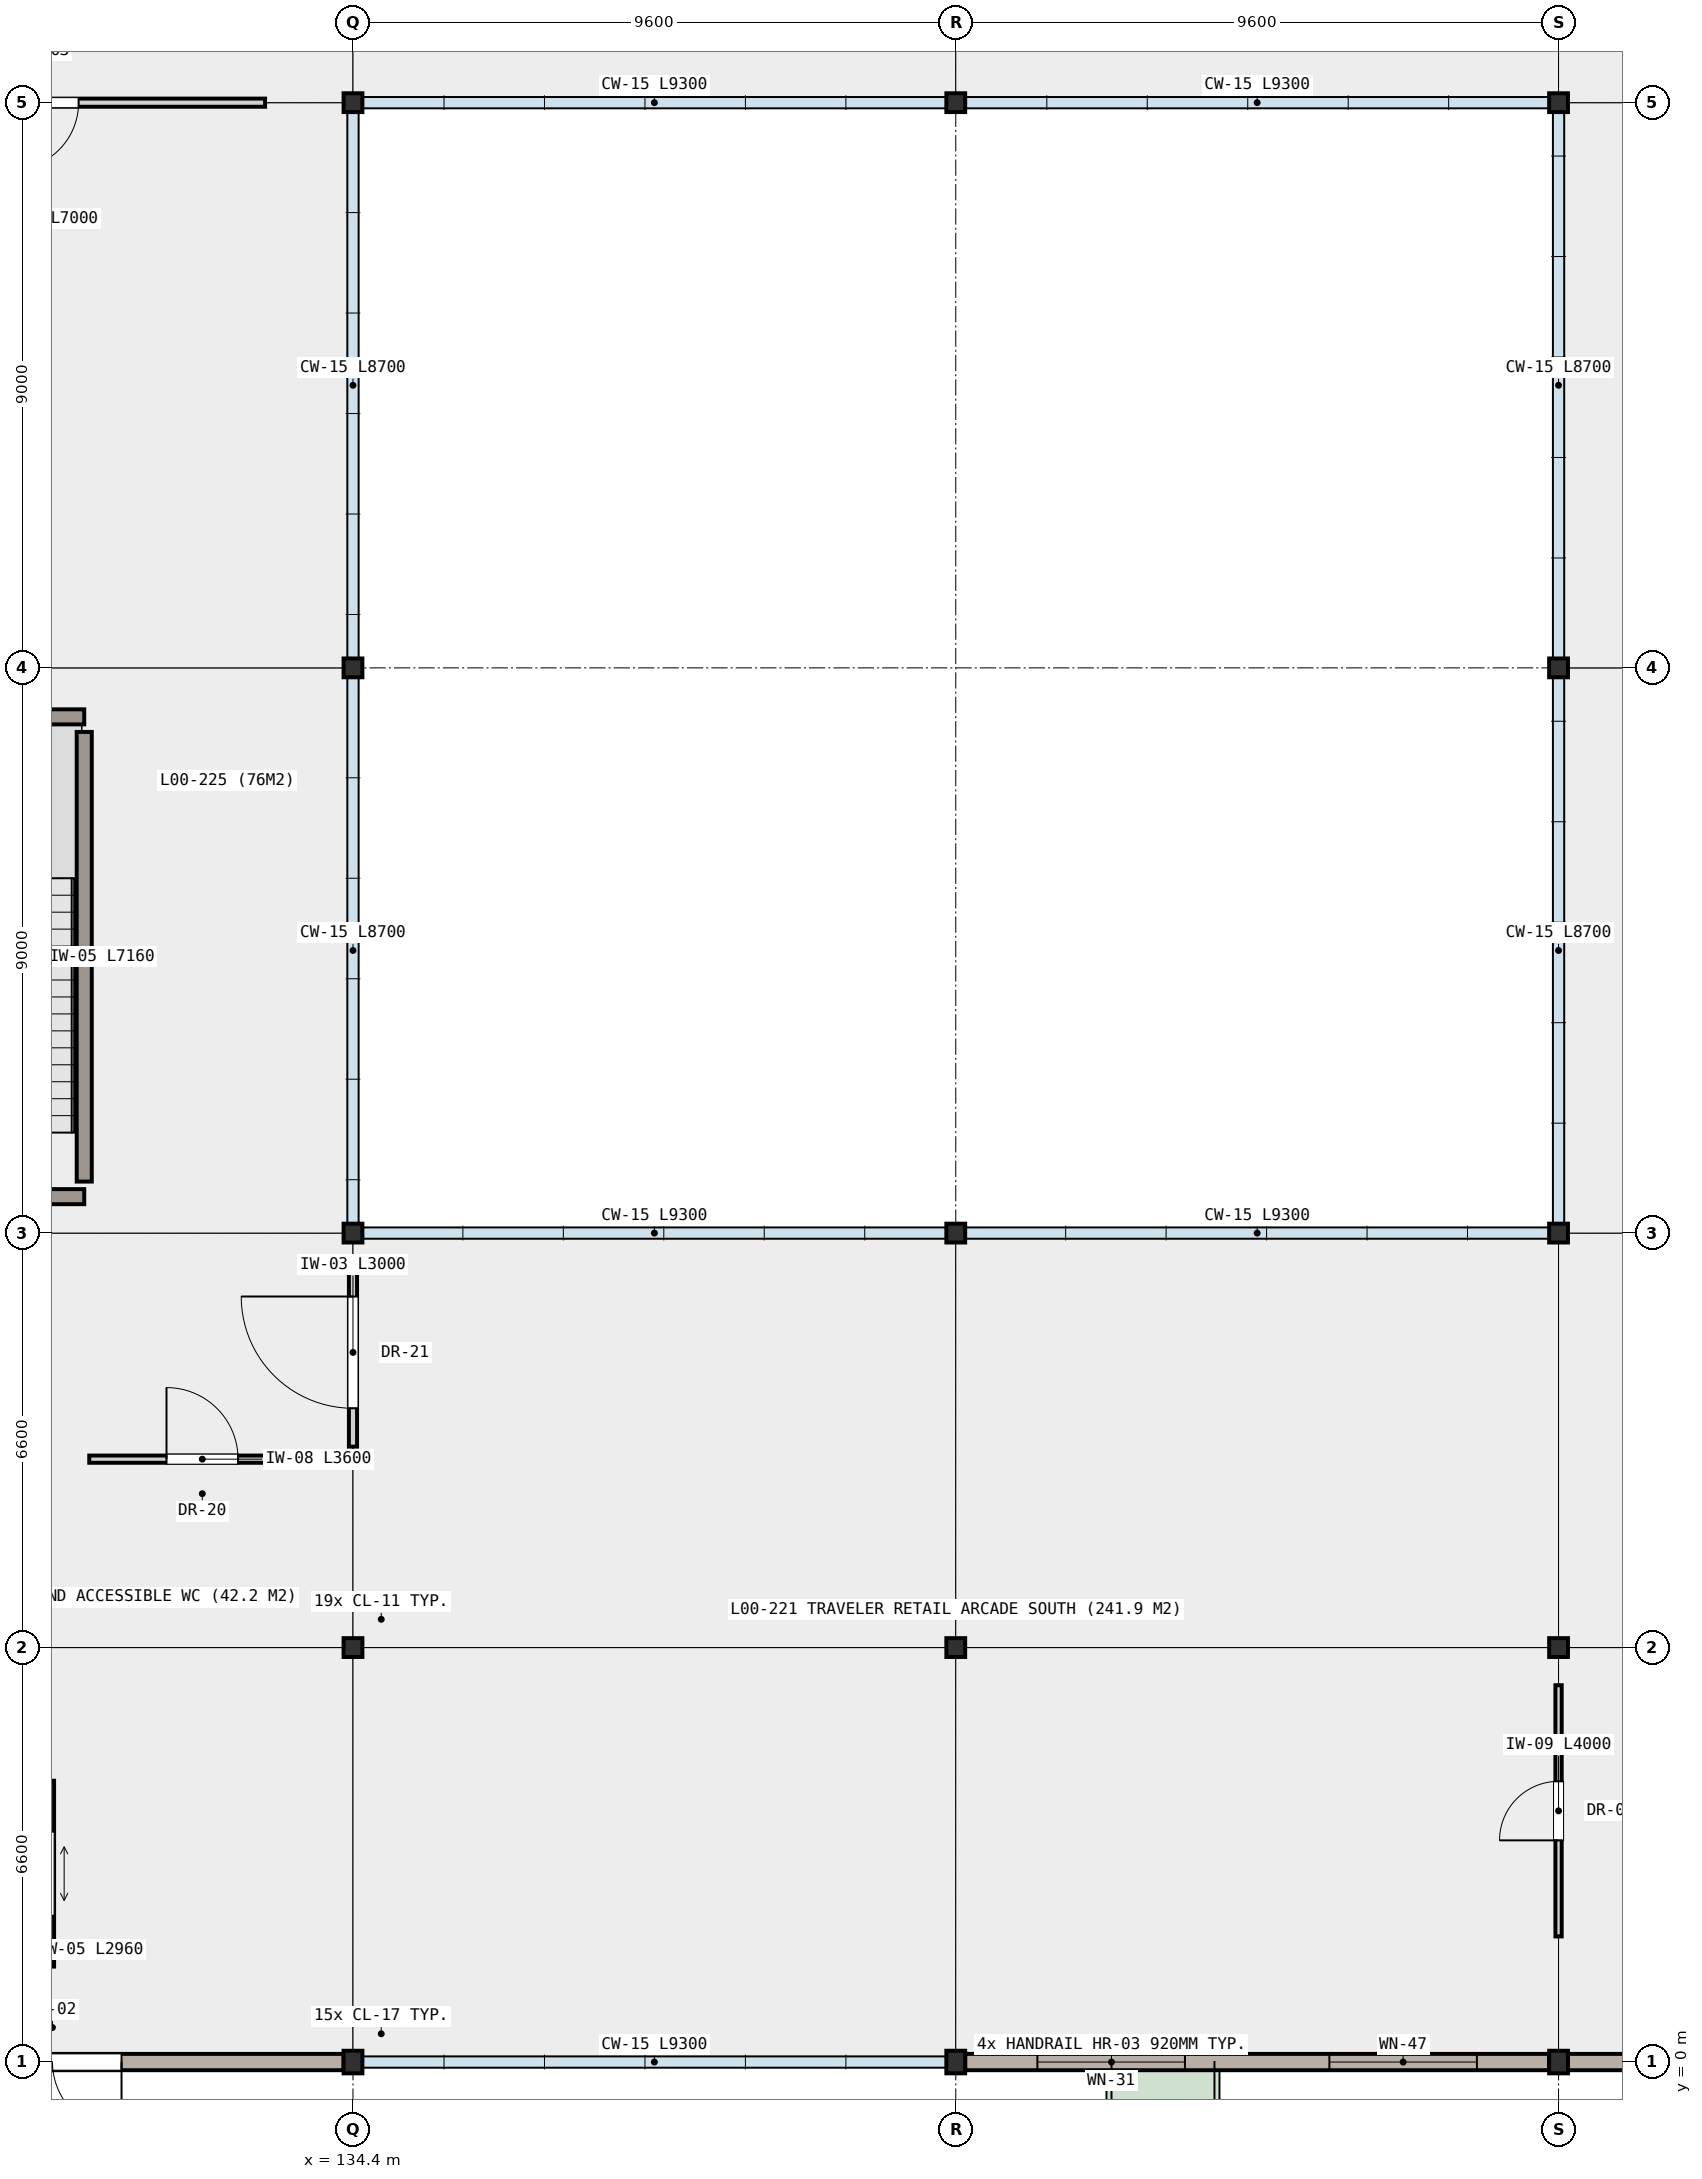
"""IFC4 building model, lengths in metres.
Left out: names, types, materials, properties, quantities, classifications, styles, units other than length and angle.
Written with IfcOpenShell. Run it as: python <this file> out.ifc"""

import sys

from ifc_helpers import new_model, si_unit, direction, frame, frame_2d, origin, origin_2d, place, context, subcontext, project, spatial, rectangle, i_section, extrude, element, fill, save


model = new_model("IFC4")
c1 = context("Model", 3, precision=1e-05, world=origin(), true_north=direction((0.0, 1.0)))
c2 = subcontext(c1, "Body", "Model", "MODEL_VIEW")
j1 = project(units=[si_unit("LENGTHUNIT", "METRE"), si_unit("PLANEANGLEUNIT", "RADIAN")], contexts=[c1])
p1 = place(None, origin())
s1 = spatial("IfcSite", under=j1, at=p1, CompositionType="ELEMENT")
p2 = place(p1, origin())
s2 = spatial("IfcBuilding", under=s1, at=p2, CompositionType="ELEMENT")
p3 = place(p2, origin())
s3 = spatial("IfcBuildingStorey", under=s2, at=p3, CompositionType="ELEMENT", Elevation=0.0)
p4 = place(p3, frame((134.4, 0.0, 0.0), z_axis=(0.0, 0.0, 1.0), x_axis=(1.0, 0.0, 0.0)))
e1 = element("IfcColumn", 1, at=p4, inside=s3, PredefinedType="COLUMN", context=c2, shape_type="SweptSolid", body=[
    extrude(i_section(OverallWidth=0.3, OverallDepth=0.36, WebThickness=0.012, FlangeThickness=0.022, FilletRadius=0.027, at=origin_2d()), origin(), (0.0, 0.0, 1.0), 5.4),
])
for number, where, z_axis, x_axis in (
    (2, (134.4, 6.6, 0.0), (0.0, 0.0, 1.0), (1.0, 0.0, 0.0)),
    (3, (134.4, 13.2, 0.0), (0.0, 0.0, 1.0), (1.0, 0.0, 0.0)),
    (4, (134.4, 22.2, 0.0), (0.0, 0.0, 1.0), (1.0, 0.0, 0.0)),
    (5, (134.4, 31.2, 0.0), (0.0, 0.0, 1.0), (1.0, 0.0, 0.0)),
):
    element("IfcColumn", number, at=place(p3, frame(where, z_axis=z_axis, x_axis=x_axis)), inside=s3, PredefinedType="COLUMN", context=c2, shape_type="SweptSolid", body=[
        extrude(i_section(OverallWidth=0.3, OverallDepth=0.3, WebThickness=0.011, FlangeThickness=0.019, FilletRadius=0.027, at=origin_2d()), origin(), (0.0, 0.0, 1.0), 5.4),
    ])
p5 = place(p3, frame((144.0, 0.0, 0.0), z_axis=(0.0, 0.0, 1.0), x_axis=(1.0, 0.0, 0.0)))
e6 = element("IfcColumn", 6, at=p5, inside=s3, PredefinedType="COLUMN", context=c2, shape_type="SweptSolid", body=[
    extrude(i_section(OverallWidth=0.3, OverallDepth=0.36, WebThickness=0.012, FlangeThickness=0.022, FilletRadius=0.027, at=origin_2d()), origin(), (0.0, 0.0, 1.0), 5.4),
])
for number, where, z_axis, x_axis in (
    (7, (144.0, 6.6, 0.0), (0.0, 0.0, 1.0), (1.0, 0.0, 0.0)),
    (8, (144.0, 13.2, 0.0), (0.0, 0.0, 1.0), (1.0, 0.0, 0.0)),
    (9, (144.0, 31.2, 0.0), (0.0, 0.0, 1.0), (1.0, 0.0, 0.0)),
):
    element("IfcColumn", number, at=place(p3, frame(where, z_axis=z_axis, x_axis=x_axis)), inside=s3, PredefinedType="COLUMN", context=c2, shape_type="SweptSolid", body=[
        extrude(i_section(OverallWidth=0.3, OverallDepth=0.3, WebThickness=0.011, FlangeThickness=0.019, FilletRadius=0.027, at=origin_2d()), origin(), (0.0, 0.0, 1.0), 5.4),
    ])
p6 = place(p3, frame((153.6, 0.0, 0.0), z_axis=(0.0, 0.0, 1.0), x_axis=(1.0, 0.0, 0.0)))
e10 = element("IfcColumn", 10, at=p6, inside=s3, PredefinedType="COLUMN", context=c2, shape_type="SweptSolid", body=[
    extrude(i_section(OverallWidth=0.3, OverallDepth=0.36, WebThickness=0.012, FlangeThickness=0.022, FilletRadius=0.027, at=origin_2d()), origin(), (0.0, 0.0, 1.0), 5.4),
])
for number, where, z_axis, x_axis in (
    (11, (153.6, 6.6, 0.0), (0.0, 0.0, 1.0), (1.0, 0.0, 0.0)),
    (12, (153.6, 13.2, 0.0), (0.0, 0.0, 1.0), (1.0, 0.0, 0.0)),
    (13, (153.6, 22.2, 0.0), (0.0, 0.0, 1.0), (1.0, 0.0, 0.0)),
    (14, (153.6, 31.2, 0.0), (0.0, 0.0, 1.0), (1.0, 0.0, 0.0)),
):
    element("IfcColumn", number, at=place(p3, frame(where, z_axis=z_axis, x_axis=x_axis)), inside=s3, PredefinedType="COLUMN", context=c2, shape_type="SweptSolid", body=[
        extrude(i_section(OverallWidth=0.3, OverallDepth=0.3, WebThickness=0.011, FlangeThickness=0.019, FilletRadius=0.027, at=origin_2d()), origin(), (0.0, 0.0, 1.0), 5.4),
    ])
p7 = place(p3, frame((163.05, 0.0, 0.0), z_axis=(0.0, 0.0, 1.0), x_axis=(-1.0, 0.0, 0.0)))
e15 = element("IfcWall", 15, at=p7, inside=s3, PredefinedType="SOLIDWALL", context=c2, shape_type="SweptSolid", body=[
    extrude(rectangle(XDim=9.3, YDim=0.26, at=frame_2d((4.65, 0.0))), origin(), (0.0, 0.0, 1.0), 4.73),
])
p8 = place(p7, frame((3.725, 0.0, 0.0)))
e16 = element("IfcOpeningElement", 16, at=p8, cuts=e15, PredefinedType="OPENING", context=c2, shape_type="SweptSolid", body=[
    extrude(rectangle(XDim=1.85, YDim=2.35, at=frame_2d((0.925, 1.175))), frame((0.0, 0.14, 0.0), z_axis=(0.0, -1.0, 0.0), x_axis=(1.0, 0.0, 0.0)), (0.0, 0.0, 1.0), 0.28),
])
p9 = place(p3, frame((153.45, 0.0, 0.0), z_axis=(0.0, 0.0, 1.0), x_axis=(-1.0, 0.0, 0.0)))
e17 = element("IfcWall", 17, at=p9, inside=s3, PredefinedType="SOLIDWALL", context=c2, shape_type="SweptSolid", body=[
    extrude(rectangle(XDim=9.3, YDim=0.26, at=frame_2d((4.65, 0.0))), origin(), (0.0, 0.0, 1.0), 4.73),
])
p10 = place(p9, frame((1.15, 0.0, 0.85)))
e18 = element("IfcOpeningElement", 18, at=p10, cuts=e17, PredefinedType="OPENING", context=c2, shape_type="SweptSolid", body=[
    extrude(rectangle(XDim=2.35, YDim=1.5, at=frame_2d((1.175, 0.75))), frame((0.0, 0.14, 0.0), z_axis=(0.0, -1.0, 0.0), x_axis=(1.0, 0.0, 0.0)), (0.0, 0.0, 1.0), 0.28),
])
p11 = place(p9, frame((5.8, 0.0, 0.85)))
e19 = element("IfcOpeningElement", 19, at=p11, cuts=e17, PredefinedType="OPENING", context=c2, shape_type="SweptSolid", body=[
    extrude(rectangle(XDim=2.35, YDim=1.85, at=frame_2d((1.175, 0.925))), frame((0.0, 0.14, 0.0), z_axis=(0.0, -1.0, 0.0), x_axis=(1.0, 0.0, 0.0)), (0.0, 0.0, 1.0), 0.28),
])
p12 = place(p3, frame((134.25, 0.0, 0.0), z_axis=(0.0, 0.0, 1.0), x_axis=(-1.0, 0.0, 0.0)))
e20 = element("IfcWall", 20, at=p12, inside=s3, PredefinedType="SOLIDWALL", context=c2, shape_type="SweptSolid", body=[
    extrude(rectangle(XDim=9.272, YDim=0.26, at=frame_2d((4.636, 0.0))), origin(), (0.0, 0.0, 1.0), 4.73),
])
p13 = place(p12, frame((3.536, 0.0, 0.0)))
e21 = element("IfcOpeningElement", 21, at=p13, cuts=e20, PredefinedType="OPENING", context=c2, shape_type="SweptSolid", body=[
    extrude(rectangle(XDim=2.2, YDim=2.55, at=frame_2d((1.1, 1.275))), frame((0.0, 0.14, 0.0), z_axis=(0.0, -1.0, 0.0), x_axis=(1.0, 0.0, 0.0)), (0.0, 0.0, 1.0), 0.28),
])
p14 = place(p3, frame((129.52, 4.48, 0.0), z_axis=(0.0, 0.0, 1.0), x_axis=(0.0, -1.0, 0.0)))
e22 = element("IfcWall", 22, at=p14, inside=s3, PredefinedType="SHEAR", context=c2, shape_type="SweptSolid", body=[
    extrude(rectangle(XDim=2.96, YDim=0.24, at=frame_2d((1.48, 0.0))), origin(), (0.0, 0.0, 1.0), 5.12),
])
p15 = place(p14, frame((0.81, 0.0, 0.0)))
e23 = element("IfcOpeningElement", 23, at=p15, cuts=e22, PredefinedType="OPENING", context=c2, shape_type="SweptSolid", body=[
    extrude(rectangle(XDim=1.34, YDim=2.18, at=frame_2d((0.67, 1.09))), frame((0.0, 0.13, 0.0), z_axis=(0.0, -1.0, 0.0), x_axis=(1.0, 0.0, 0.0)), (0.0, 0.0, 1.0), 0.26),
])
p16 = place(p3, frame((130.12, 13.78, 0.0), z_axis=(0.0, 0.0, 1.0), x_axis=(-1.0, 0.0, 0.0)))
e24 = element("IfcWall", 24, at=p16, inside=s3, PredefinedType="SHEAR", context=c2, shape_type="SweptSolid", body=[
    extrude(rectangle(XDim=4.54, YDim=0.24, at=frame_2d((2.27, 0.0))), origin(), (0.0, 0.0, 1.0), 5.12),
])
p17 = place(p16, frame((1.61, 0.0, 0.0)))
e25 = element("IfcOpeningElement", 25, at=p17, cuts=e24, PredefinedType="OPENING", context=c2, shape_type="SweptSolid", body=[
    extrude(rectangle(XDim=1.32, YDim=2.15, at=frame_2d((0.66, 1.075))), frame((0.0, 0.13, 0.0), z_axis=(0.0, -1.0, 0.0), x_axis=(1.0, 0.0, 0.0)), (0.0, 0.0, 1.0), 0.26),
])
p18 = place(p3, frame((125.58, 21.42, 0.0), z_axis=(0.0, 0.0, 1.0), x_axis=(1.0, 0.0, 0.0)))
e26 = element("IfcWall", 26, at=p18, inside=s3, PredefinedType="SHEAR", context=c2, shape_type="SweptSolid", body=[
    extrude(rectangle(XDim=4.54, YDim=0.24, at=frame_2d((2.27, 0.0))), origin(), (0.0, 0.0, 1.0), 5.12),
])
p19 = place(p3, frame((130.12, 21.18, 0.0), z_axis=(0.0, 0.0, 1.0), x_axis=(0.0, -1.0, 0.0)))
e27 = element("IfcWall", 27, at=p19, inside=s3, PredefinedType="SHEAR", context=c2, shape_type="SweptSolid", body=[
    extrude(rectangle(XDim=7.16, YDim=0.24, at=frame_2d((3.58, 0.0))), origin(), (0.0, 0.0, 1.0), 5.12),
])
p20 = place(p3, frame((134.4, 9.8, 0.0), z_axis=(0.0, 0.0, 1.0), x_axis=(0.0, 1.0, 0.0)))
e28 = element("IfcWall", 28, at=p20, inside=s3, PredefinedType="PARTITIONING", context=c2, shape_type="SweptSolid", body=[
    extrude(rectangle(XDim=3.0, YDim=0.13, at=frame_2d((1.5, 0.0))), origin(), (0.0, 0.0, 1.0), 4.59),
])
p21 = place(p20, frame((0.61, 0.0, 0.0)))
e29 = element("IfcOpeningElement", 29, at=p21, cuts=e28, PredefinedType="OPENING", context=c2, shape_type="SweptSolid", body=[
    extrude(rectangle(XDim=1.78, YDim=2.24, at=frame_2d((0.89, 1.12))), frame((0.0, 0.075, 0.0), z_axis=(0.0, -1.0, 0.0), x_axis=(1.0, 0.0, 0.0)), (0.0, 0.0, 1.0), 0.15),
])
p22 = place(p3, frame((153.6, 2.0, 0.0), z_axis=(0.0, 0.0, 1.0), x_axis=(0.0, 1.0, 0.0)))
e30 = element("IfcWall", 30, at=p22, inside=s3, PredefinedType="PARTITIONING", context=c2, shape_type="SweptSolid", body=[
    extrude(rectangle(XDim=4.0, YDim=0.1, at=frame_2d((2.0, 0.0))), origin(), (0.0, 0.0, 1.0), 4.59),
])
p23 = place(p22, frame((1.53, 0.0, 0.0)))
e31 = element("IfcOpeningElement", 31, at=p23, cuts=e30, PredefinedType="OPENING", context=c2, shape_type="SweptSolid", body=[
    extrude(rectangle(XDim=0.94, YDim=2.12, at=frame_2d((0.47, 1.06))), frame((0.0, 0.06, 0.0), z_axis=(0.0, -1.0, 0.0), x_axis=(1.0, 0.0, 0.0)), (0.0, 0.0, 1.0), 0.12),
])
p24 = place(p3, frame((133.0, 31.2, 0.0), z_axis=(0.0, 0.0, 1.0), x_axis=(-1.0, 0.0, 0.0)))
e32 = element("IfcWall", 32, at=p24, inside=s3, PredefinedType="PARTITIONING", context=c2, shape_type="SweptSolid", body=[
    extrude(rectangle(XDim=7.0, YDim=0.13, at=frame_2d((3.5, 0.0))), origin(), (0.0, 0.0, 1.0), 4.49),
])
p25 = place(p24, frame((2.97, 0.0, 0.0)))
e33 = element("IfcOpeningElement", 33, at=p25, cuts=e32, PredefinedType="OPENING", context=c2, shape_type="SweptSolid", body=[
    extrude(rectangle(XDim=1.06, YDim=2.14, at=frame_2d((0.53, 1.07))), frame((0.0, 0.075, 0.0), z_axis=(0.0, -1.0, 0.0), x_axis=(1.0, 0.0, 0.0)), (0.0, 0.0, 1.0), 0.15),
])
p26 = place(p3, frame((130.2, 9.6, 0.0), z_axis=(0.0, 0.0, 1.0), x_axis=(1.0, 0.0, 0.0)))
e34 = element("IfcWall", 34, at=p26, inside=s3, PredefinedType="PARTITIONING", context=c2, shape_type="SweptSolid", body=[
    extrude(rectangle(XDim=3.6, YDim=0.115, at=frame_2d((1.8, 0.0))), origin(), (0.0, 0.0, 1.0), 5.12),
])
p27 = place(p26, frame((1.23, 0.0, 0.0)))
e35 = element("IfcOpeningElement", 35, at=p27, cuts=e34, PredefinedType="OPENING", context=c2, shape_type="SweptSolid", body=[
    extrude(rectangle(XDim=1.14, YDim=2.16, at=frame_2d((0.57, 1.08))), frame((0.0, 0.067, 0.0), z_axis=(0.0, -1.0, 0.0), x_axis=(1.0, 0.0, 0.0)), (0.0, 0.0, 1.0), 0.135),
])
p28 = place(p10, origin())
e36 = element("IfcWindow", 36, at=p28, inside=s3, PartitioningType="SINGLE_PANEL", PredefinedType="WINDOW", context=c2, shape_type="SweptSolid", body=[
    extrude(rectangle(XDim=2.35, YDim=1.5, at=frame_2d((1.175, 0.75))), frame((0.0, 0.03, 0.0), z_axis=(0.0, -1.0, 0.0), x_axis=(1.0, 0.0, 0.0)), (0.0, 0.0, 1.0), 0.06),
])
fill(e18, e36)
p29 = place(p11, origin())
e37 = element("IfcWindow", 37, at=p29, inside=s3, PartitioningType="SINGLE_PANEL", PredefinedType="WINDOW", context=c2, shape_type="SweptSolid", body=[
    extrude(rectangle(XDim=2.35, YDim=1.85, at=frame_2d((1.175, 0.925))), frame((0.0, 0.03, 0.0), z_axis=(0.0, -1.0, 0.0), x_axis=(1.0, 0.0, 0.0)), (0.0, 0.0, 1.0), 0.06),
])
fill(e19, e37)
p30 = place(p13, origin())
e38 = element("IfcDoor", 38, at=p30, inside=s3, OperationType="DOUBLE_DOOR_SINGLE_SWING", PredefinedType="DOOR", context=c2, shape_type="SweptSolid", body=[
    extrude(rectangle(XDim=2.2, YDim=2.55, at=frame_2d((1.1, 1.275))), frame((0.0, 0.025, 0.0), z_axis=(0.0, -1.0, 0.0), x_axis=(1.0, 0.0, 0.0)), (0.0, 0.0, 1.0), 0.05),
])
fill(e21, e38)
p31 = place(p21, origin())
e39 = element("IfcDoor", 39, at=p31, inside=s3, OperationType="SINGLE_SWING_RIGHT", PredefinedType="DOOR", context=c2, shape_type="SweptSolid", body=[
    extrude(rectangle(XDim=1.78, YDim=2.24, at=frame_2d((0.89, 1.12))), frame((0.0, 0.025, 0.0), z_axis=(0.0, -1.0, 0.0), x_axis=(1.0, 0.0, 0.0)), (0.0, 0.0, 1.0), 0.05),
])
fill(e29, e39)
p32 = place(p23, origin())
e40 = element("IfcDoor", 40, at=p32, inside=s3, OperationType="SINGLE_SWING_LEFT", PredefinedType="DOOR", context=c2, shape_type="SweptSolid", body=[
    extrude(rectangle(XDim=0.94, YDim=2.12, at=frame_2d((0.47, 1.06))), frame((0.0, 0.025, 0.0), z_axis=(0.0, -1.0, 0.0), x_axis=(1.0, 0.0, 0.0)), (0.0, 0.0, 1.0), 0.05),
])
fill(e31, e40)
p33 = place(p25, origin())
e41 = element("IfcDoor", 41, at=p33, inside=s3, OperationType="SINGLE_SWING_RIGHT", PredefinedType="DOOR", context=c2, shape_type="SweptSolid", body=[
    extrude(rectangle(XDim=1.06, YDim=2.14, at=frame_2d((0.53, 1.07))), frame((0.0, 0.025, 0.0), z_axis=(0.0, -1.0, 0.0), x_axis=(1.0, 0.0, 0.0)), (0.0, 0.0, 1.0), 0.05),
])
fill(e33, e41)
p34 = place(p27, origin())
e42 = element("IfcDoor", 42, at=p34, inside=s3, OperationType="SINGLE_SWING_LEFT", PredefinedType="DOOR", context=c2, shape_type="SweptSolid", body=[
    extrude(rectangle(XDim=1.14, YDim=2.16, at=frame_2d((0.57, 1.08))), frame((0.0, 0.025, 0.0), z_axis=(0.0, -1.0, 0.0), x_axis=(1.0, 0.0, 0.0)), (0.0, 0.0, 1.0), 0.05),
])
fill(e35, e42)
save(model, sys.argv[1])
